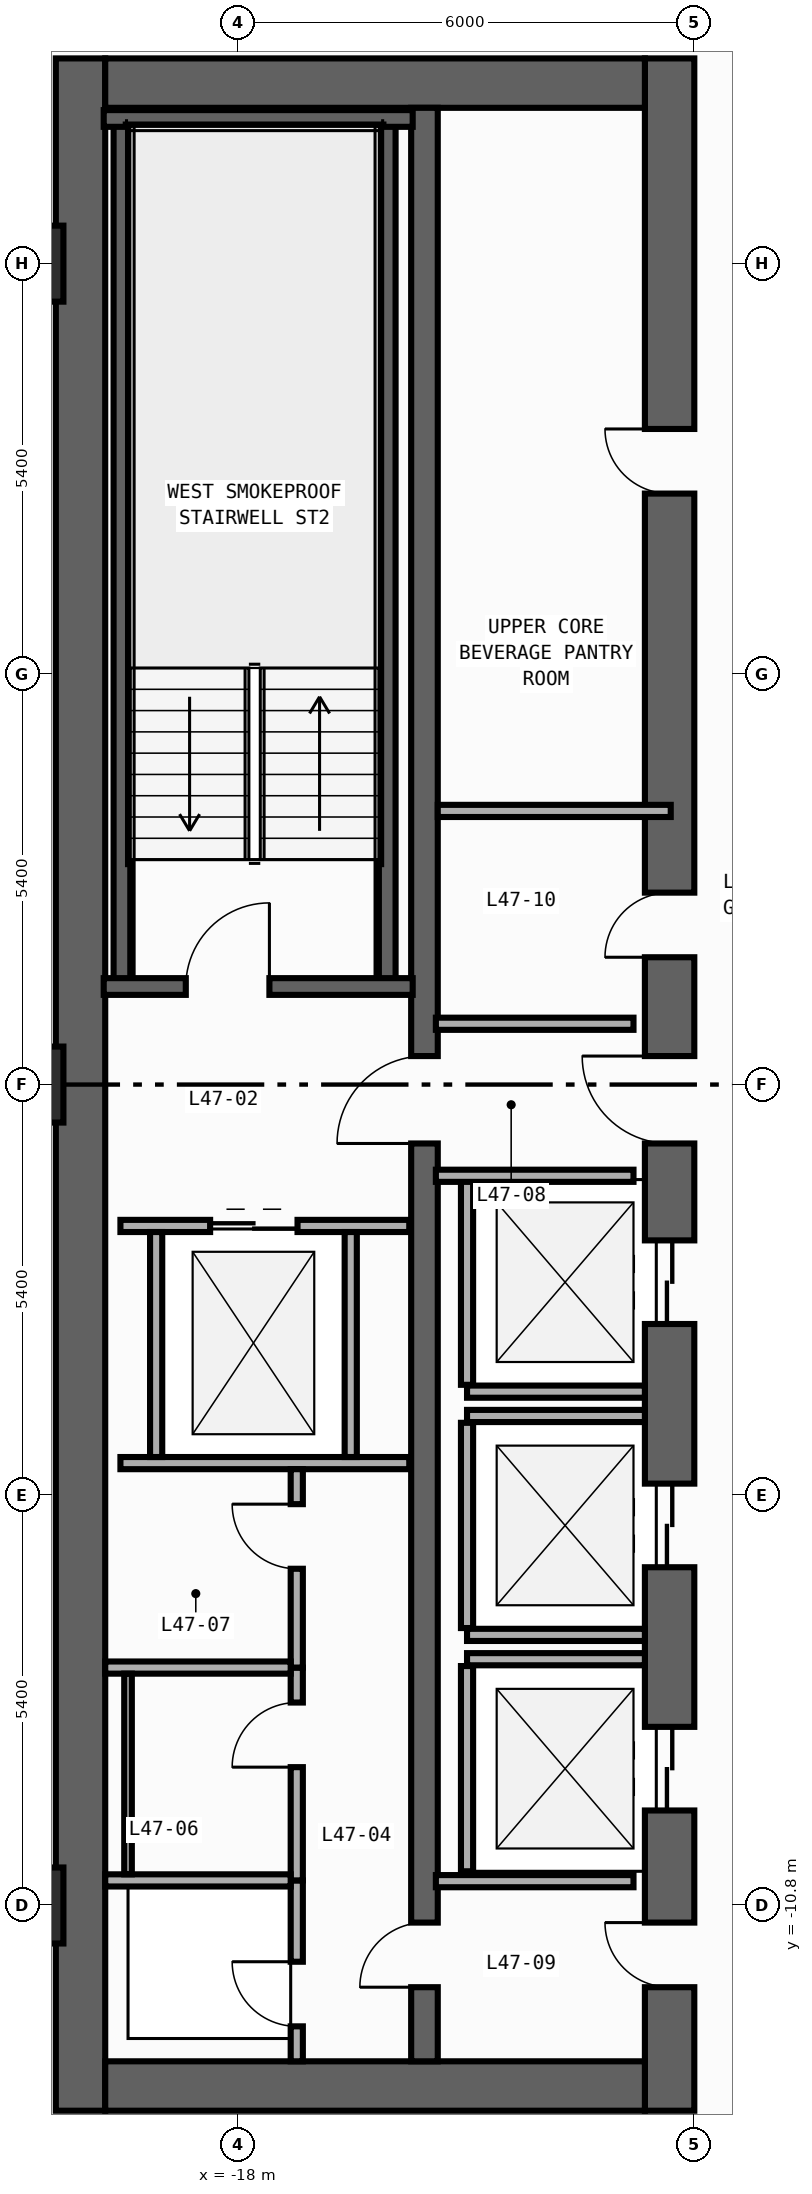
"""IFC4 building model, lengths in metres.
Left out: names, types, materials, properties, quantities, classifications, styles, units other than length and angle.
Written with IfcOpenShell. Run it as: python <this file> out.ifc"""

import sys

from ifc_helpers import new_model, si_unit, direction, frame, frame_2d, origin, origin_2d, place, context, subcontext, project, spatial, rectangle, extrude, element, fill, save


model = new_model("IFC4")
c1 = context("Model", 3, precision=1e-05, world=origin(), true_north=direction((0.0, 1.0)))
c2 = subcontext(c1, "Body", "Model", "MODEL_VIEW")
j1 = project(units=[si_unit("LENGTHUNIT", "METRE"), si_unit("PLANEANGLEUNIT", "RADIAN")], contexts=[c1])
p1 = place(None, origin())
s1 = spatial("IfcSite", under=j1, at=p1, CompositionType="ELEMENT")
p2 = place(p1, origin())
s2 = spatial("IfcBuilding", under=s1, at=p2, CompositionType="ELEMENT")
p3 = place(p2, frame((0.0, 0.0, 203.0)))
s3 = spatial("IfcBuildingStorey", under=s2, at=p3, CompositionType="ELEMENT", Elevation=203.0)
p4 = place(p3, frame((-20.075, -13.5, 0.0), z_axis=(0.0, 0.0, 1.0), x_axis=(0.0, 1.0, 0.0)))
e1 = element("IfcWall", 1, at=p4, inside=s3, PredefinedType="SHEAR", context=c2, shape_type="SweptSolid", body=[
    extrude(rectangle(XDim=27.0, YDim=0.65, at=frame_2d((13.5, 0.0))), origin(), (0.0, 0.0, 1.0), 3.54),
])
p5 = place(p3, frame((-12.325, -13.5, 0.0), z_axis=(0.0, 0.0, 1.0), x_axis=(0.0, 1.0, 0.0)))
e2 = element("IfcWall", 2, at=p5, inside=s3, PredefinedType="SHEAR", context=c2, shape_type="SweptSolid", body=[
    extrude(rectangle(XDim=27.0, YDim=0.65, at=frame_2d((13.5, 0.0))), origin(), (0.0, 0.0, 1.0), 3.54),
])
p6 = place(p5, frame((10.35, 0.0, 0.0)))
e3 = element("IfcOpeningElement", 3, at=p6, cuts=e2, PredefinedType="OPENING", context=c2, shape_type="SweptSolid", body=[
    extrude(rectangle(XDim=1.1, YDim=2.2, at=frame_2d((0.55, 1.1))), frame((0.0, 0.335, 0.0), z_axis=(0.0, -1.0, 0.0), x_axis=(1.0, 0.0, 0.0)), (0.0, 0.0, 1.0), 0.67),
])
p7 = place(p5, frame((7.15, 0.0, 0.0)))
e4 = element("IfcOpeningElement", 4, at=p7, cuts=e2, PredefinedType="OPENING", context=c2, shape_type="SweptSolid", body=[
    extrude(rectangle(XDim=1.1, YDim=2.2, at=frame_2d((0.55, 1.1))), frame((0.0, 0.335, 0.0), z_axis=(0.0, -1.0, 0.0), x_axis=(1.0, 0.0, 0.0)), (0.0, 0.0, 1.0), 0.67),
])
p8 = place(p5, frame((3.95, 0.0, 0.0)))
e5 = element("IfcOpeningElement", 5, at=p8, cuts=e2, PredefinedType="OPENING", context=c2, shape_type="SweptSolid", body=[
    extrude(rectangle(XDim=1.1, YDim=2.2, at=frame_2d((0.55, 1.1))), frame((0.0, 0.335, 0.0), z_axis=(0.0, -1.0, 0.0), x_axis=(1.0, 0.0, 0.0)), (0.0, 0.0, 1.0), 0.67),
])
p9 = place(p5, frame((15.175, 0.0, 0.0)))
e6 = element("IfcOpeningElement", 6, at=p9, cuts=e2, PredefinedType="OPENING", context=c2, shape_type="SweptSolid", body=[
    extrude(rectangle(XDim=0.85, YDim=2.1, at=frame_2d((0.425, 1.05))), frame((0.0, 0.335, 0.0), z_axis=(0.0, -1.0, 0.0), x_axis=(1.0, 0.0, 0.0)), (0.0, 0.0, 1.0), 0.67),
])
p10 = place(p5, frame((21.275, 0.0, 0.0)))
e7 = element("IfcOpeningElement", 7, at=p10, cuts=e2, PredefinedType="OPENING", context=c2, shape_type="SweptSolid", body=[
    extrude(rectangle(XDim=0.85, YDim=2.1, at=frame_2d((0.425, 1.05))), frame((0.0, 0.335, 0.0), z_axis=(0.0, -1.0, 0.0), x_axis=(1.0, 0.0, 0.0)), (0.0, 0.0, 1.0), 0.67),
])
p11 = place(p5, frame((12.725, 0.0, 0.0)))
e8 = element("IfcOpeningElement", 8, at=p11, cuts=e2, PredefinedType="OPENING", context=c2, shape_type="SweptSolid", body=[
    extrude(rectangle(XDim=1.15, YDim=2.2, at=frame_2d((0.575, 1.1))), frame((0.0, 0.335, 0.0), z_axis=(0.0, -1.0, 0.0), x_axis=(1.0, 0.0, 0.0)), (0.0, 0.0, 1.0), 0.67),
])
p12 = place(p5, frame((1.625, 0.0, 0.0)))
e9 = element("IfcOpeningElement", 9, at=p12, cuts=e2, PredefinedType="OPENING", context=c2, shape_type="SweptSolid", body=[
    extrude(rectangle(XDim=0.85, YDim=2.1, at=frame_2d((0.425, 1.05))), frame((0.0, 0.335, 0.0), z_axis=(0.0, -1.0, 0.0), x_axis=(1.0, 0.0, 0.0)), (0.0, 0.0, 1.0), 0.67),
])
for number, where, z_axis, x_axis in (
    (10, (-19.75, -13.175, 0.0), (0.0, 0.0, 1.0), (1.0, 0.0, 0.0)),
    (11, (-19.75, 13.175, 0.0), (0.0, 0.0, 1.0), (1.0, 0.0, 0.0)),
):
    element("IfcWall", number, at=place(p3, frame(where, z_axis=z_axis, x_axis=x_axis)), inside=s3, PredefinedType="SHEAR", context=c2, shape_type="SweptSolid", body=[
        extrude(rectangle(XDim=7.1, YDim=0.65, at=frame_2d((3.55, 0.0))), origin(), (0.0, 0.0, 1.0), 3.54),
    ])
p13 = place(p3, frame((-15.55, -12.85, 0.0), z_axis=(0.0, 0.0, 1.0), x_axis=(0.0, 1.0, 0.0)))
e12 = element("IfcWall", 12, at=p13, inside=s3, PredefinedType="SHEAR", context=c2, shape_type="SweptSolid", body=[
    extrude(rectangle(XDim=25.7, YDim=0.35, at=frame_2d((12.85, 0.0))), origin(), (0.0, 0.0, 1.0), 3.54),
])
p14 = place(p13, frame((12.075, 0.0, 0.0)))
e13 = element("IfcOpeningElement", 13, at=p14, cuts=e12, PredefinedType="OPENING", context=c2, shape_type="SweptSolid", body=[
    extrude(rectangle(XDim=1.15, YDim=2.2, at=frame_2d((0.575, 1.1))), frame((0.0, 0.185, 0.0), z_axis=(0.0, -1.0, 0.0), x_axis=(1.0, 0.0, 0.0)), (0.0, 0.0, 1.0), 0.37),
])
p15 = place(p13, frame((0.975, 0.0, 0.0)))
e14 = element("IfcOpeningElement", 14, at=p15, cuts=e12, PredefinedType="OPENING", context=c2, shape_type="SweptSolid", body=[
    extrude(rectangle(XDim=0.85, YDim=2.1, at=frame_2d((0.425, 1.05))), frame((0.0, 0.185, 0.0), z_axis=(0.0, -1.0, 0.0), x_axis=(1.0, 0.0, 0.0)), (0.0, 0.0, 1.0), 0.37),
])
for number, where, z_axis, x_axis in (
    (15, (-16.04, 1.29, 0.0), (0.0, 0.0, 1.0), (0.0, 1.0, 0.0)),
    (16, (-19.53, 1.29, 0.0), (0.0, 0.0, 1.0), (0.0, 1.0, 0.0)),
):
    element("IfcWall", number, at=place(p3, frame(where, z_axis=z_axis, x_axis=x_axis)), inside=s3, PredefinedType="SHEAR", context=c2, shape_type="SweptSolid", body=[
        extrude(rectangle(XDim=11.42, YDim=0.22, at=frame_2d((5.71, 0.0))), origin(), (0.0, 0.0, 1.0), 3.54),
    ])
p16 = place(p3, frame((-19.77, 12.71, 0.0), z_axis=(0.0, 0.0, 1.0), x_axis=(1.0, 0.0, 0.0)))
e17 = element("IfcWall", 17, at=p16, inside=s3, PredefinedType="SHEAR", context=c2, shape_type="SweptSolid", body=[
    extrude(rectangle(XDim=4.065, YDim=0.22, at=frame_2d((2.032, 0.0))), origin(), (0.0, 0.0, 1.0), 3.54),
])
p17 = place(p3, frame((-19.77, 1.29, 0.0), z_axis=(0.0, 0.0, 1.0), x_axis=(1.0, 0.0, 0.0)))
e18 = element("IfcWall", 18, at=p17, inside=s3, PredefinedType="SHEAR", context=c2, shape_type="SweptSolid", body=[
    extrude(rectangle(XDim=4.065, YDim=0.22, at=frame_2d((2.032, 0.0))), origin(), (0.0, 0.0, 1.0), 3.54),
])
p18 = place(p17, frame((1.08, 0.0, 0.0)))
e19 = element("IfcOpeningElement", 19, at=p18, cuts=e18, PredefinedType="OPENING", context=c2, shape_type="SweptSolid", body=[
    extrude(rectangle(XDim=1.1, YDim=2.2, at=frame_2d((0.55, 1.1))), frame((0.0, 0.12, 0.0), z_axis=(0.0, -1.0, 0.0), x_axis=(1.0, 0.0, 0.0)), (0.0, 0.0, 1.0), 0.24),
])
for number, where, z_axis, x_axis in (
    (20, (-20.8, -10.8, 0.0), (0.0, 0.0, 1.0), (1.0, 0.0, 0.0)),
    (21, (-20.8, 0.0, 0.0), (0.0, 0.0, 1.0), (1.0, 0.0, 0.0)),
    (22, (-20.8, 10.8, 0.0), (0.0, 0.0, 1.0), (1.0, 0.0, 0.0)),
):
    element("IfcColumn", number, at=place(p3, frame(where, z_axis=z_axis, x_axis=x_axis)), inside=s3, PredefinedType="COLUMN", context=c2, shape_type="SweptSolid", body=[
        extrude(rectangle(XDim=1.0, YDim=1.0, at=origin_2d()), origin(), (0.0, 0.0, 1.0), 3.8),
    ])
p19 = place(p3, frame((-14.99, -4.04, 0.0), z_axis=(0.0, 0.0, 1.0), x_axis=(1.0, 0.0, 0.0)))
e23 = element("IfcWall", 23, at=p19, inside=s3, PredefinedType="STANDARD", context=c2, shape_type="SweptSolid", body=[
    extrude(rectangle(XDim=2.34, YDim=0.16, at=frame_2d((1.17, 0.0))), origin(), (0.0, 0.0, 1.0), 3.54),
])
p20 = place(p3, frame((-14.99, -3.95, 0.0), z_axis=(0.0, 0.0, 1.0), x_axis=(0.0, 1.0, 0.0)))
e24 = element("IfcWall", 24, at=p20, inside=s3, PredefinedType="STANDARD", context=c2, shape_type="SweptSolid", body=[
    extrude(rectangle(XDim=2.7, YDim=0.16, at=frame_2d((1.35, 0.0))), origin(), (0.0, 0.0, 1.0), 3.54),
])
for number, where, z_axis, x_axis in (
    (25, (-14.99, -7.24, 0.0), (0.0, 0.0, 1.0), (1.0, 0.0, 0.0)),
    (26, (-14.99, -4.36, 0.0), (0.0, 0.0, 1.0), (1.0, 0.0, 0.0)),
):
    element("IfcWall", number, at=place(p3, frame(where, z_axis=z_axis, x_axis=x_axis)), inside=s3, PredefinedType="STANDARD", context=c2, shape_type="SweptSolid", body=[
        extrude(rectangle(XDim=2.34, YDim=0.16, at=frame_2d((1.17, 0.0))), origin(), (0.0, 0.0, 1.0), 3.54),
    ])
p21 = place(p3, frame((-14.99, -7.15, 0.0), z_axis=(0.0, 0.0, 1.0), x_axis=(0.0, 1.0, 0.0)))
e27 = element("IfcWall", 27, at=p21, inside=s3, PredefinedType="STANDARD", context=c2, shape_type="SweptSolid", body=[
    extrude(rectangle(XDim=2.7, YDim=0.16, at=frame_2d((1.35, 0.0))), origin(), (0.0, 0.0, 1.0), 3.54),
])
p22 = place(p3, frame((-14.99, -7.56, 0.0), z_axis=(0.0, 0.0, 1.0), x_axis=(1.0, 0.0, 0.0)))
e28 = element("IfcWall", 28, at=p22, inside=s3, PredefinedType="STANDARD", context=c2, shape_type="SweptSolid", body=[
    extrude(rectangle(XDim=2.34, YDim=0.16, at=frame_2d((1.17, 0.0))), origin(), (0.0, 0.0, 1.0), 3.54),
])
p23 = place(p3, frame((-14.99, -10.35, 0.0), z_axis=(0.0, 0.0, 1.0), x_axis=(0.0, 1.0, 0.0)))
e29 = element("IfcWall", 29, at=p23, inside=s3, PredefinedType="STANDARD", context=c2, shape_type="SweptSolid", body=[
    extrude(rectangle(XDim=2.7, YDim=0.16, at=frame_2d((1.35, 0.0))), origin(), (0.0, 0.0, 1.0), 3.54),
])
p24 = place(p3, frame((-19.55, -1.86, 0.0), z_axis=(0.0, 0.0, 1.0), x_axis=(1.0, 0.0, 0.0)))
e30 = element("IfcWall", 30, at=p24, inside=s3, PredefinedType="STANDARD", context=c2, shape_type="SweptSolid", body=[
    extrude(rectangle(XDim=3.8, YDim=0.16, at=frame_2d((1.9, 0.0))), origin(), (0.0, 0.0, 1.0), 3.54),
])
p25 = place(p24, frame((1.18, 0.0, 0.0)))
e31 = element("IfcOpeningElement", 31, at=p25, cuts=e30, PredefinedType="OPENING", context=c2, shape_type="SweptSolid", body=[
    extrude(rectangle(XDim=1.15, YDim=2.2, at=frame_2d((0.575, 1.1))), frame((0.0, 0.09, 0.0), z_axis=(0.0, -1.0, 0.0), x_axis=(1.0, 0.0, 0.0)), (0.0, 0.0, 1.0), 0.18),
])
p26 = place(p3, frame((-19.55, -4.98, 0.0), z_axis=(0.0, 0.0, 1.0), x_axis=(1.0, 0.0, 0.0)))
e32 = element("IfcWall", 32, at=p26, inside=s3, PredefinedType="STANDARD", context=c2, shape_type="SweptSolid", body=[
    extrude(rectangle(XDim=3.8, YDim=0.16, at=frame_2d((1.9, 0.0))), origin(), (0.0, 0.0, 1.0), 3.54),
])
for number, where, z_axis, x_axis in (
    (33, (-19.08, -4.9, 0.0), (0.0, 0.0, 1.0), (0.0, 1.0, 0.0)),
    (34, (-16.52, -4.9, 0.0), (0.0, 0.0, 1.0), (0.0, 1.0, 0.0)),
):
    element("IfcWall", number, at=place(p3, frame(where, z_axis=z_axis, x_axis=x_axis)), inside=s3, PredefinedType="STANDARD", context=c2, shape_type="SweptSolid", body=[
        extrude(rectangle(XDim=2.96, YDim=0.16, at=frame_2d((1.48, 0.0))), origin(), (0.0, 0.0, 1.0), 3.54),
    ])
for number, where, z_axis, x_axis in (
    (35, (-15.4, 0.8, 0.0), (0.0, 0.0, 1.0), (1.0, 0.0, 0.0)),
    (36, (-15.4, -1.2, 0.0), (0.0, 0.0, 1.0), (1.0, 0.0, 0.0)),
    (37, (-15.4, -10.48, 0.0), (0.0, 0.0, 1.0), (1.0, 0.0, 0.0)),
):
    element("IfcWall", number, at=place(p3, frame(where, z_axis=z_axis, x_axis=x_axis)), inside=s3, PredefinedType="STANDARD", context=c2, shape_type="SweptSolid", body=[
        extrude(rectangle(XDim=2.6, YDim=0.16, at=frame_2d((1.3, 0.0))), origin(), (0.0, 0.0, 1.0), 3.54),
    ])
p27 = place(p3, frame((-17.23, -12.85, 0.0), z_axis=(0.0, 0.0, 1.0), x_axis=(0.0, 1.0, 0.0)))
e38 = element("IfcWall", 38, at=p27, inside=s3, PredefinedType="PARTITIONING", context=c2, shape_type="SweptSolid", body=[
    extrude(rectangle(XDim=2.38, YDim=0.16, at=frame_2d((1.19, 0.0))), origin(), (0.0, 0.0, 1.0), 3.54),
])
p28 = place(p27, frame((0.46, 0.0, 0.0)))
e39 = element("IfcOpeningElement", 39, at=p28, cuts=e38, PredefinedType="OPENING", context=c2, shape_type="SweptSolid", body=[
    extrude(rectangle(XDim=0.85, YDim=2.1, at=frame_2d((0.425, 1.05))), frame((0.0, 0.09, 0.0), z_axis=(0.0, -1.0, 0.0), x_axis=(1.0, 0.0, 0.0)), (0.0, 0.0, 1.0), 0.18),
])
p29 = place(p3, frame((-17.23, -10.47, 0.0), z_axis=(0.0, 0.0, 1.0), x_axis=(0.0, 1.0, 0.0)))
e40 = element("IfcWall", 40, at=p29, inside=s3, PredefinedType="PARTITIONING", context=c2, shape_type="SweptSolid", body=[
    extrude(rectangle(XDim=2.8, YDim=0.16, at=frame_2d((1.4, 0.0))), origin(), (0.0, 0.0, 1.0), 3.54),
])
p30 = place(p29, frame((1.49, 0.0, 0.0)))
e41 = element("IfcOpeningElement", 41, at=p30, cuts=e40, PredefinedType="OPENING", context=c2, shape_type="SweptSolid", body=[
    extrude(rectangle(XDim=0.85, YDim=2.1, at=frame_2d((0.425, 1.05))), frame((0.0, 0.09, 0.0), z_axis=(0.0, -1.0, 0.0), x_axis=(1.0, 0.0, 0.0)), (0.0, 0.0, 1.0), 0.18),
])
p31 = place(p3, frame((-17.23, -7.67, 0.0), z_axis=(0.0, 0.0, 1.0), x_axis=(0.0, 1.0, 0.0)))
e42 = element("IfcWall", 42, at=p31, inside=s3, PredefinedType="PARTITIONING", context=c2, shape_type="SweptSolid", body=[
    extrude(rectangle(XDim=2.61, YDim=0.16, at=frame_2d((1.305, 0.0))), origin(), (0.0, 0.0, 1.0), 3.54),
])
p32 = place(p31, frame((1.3, 0.0, 0.0)))
e43 = element("IfcOpeningElement", 43, at=p32, cuts=e42, PredefinedType="OPENING", context=c2, shape_type="SweptSolid", body=[
    extrude(rectangle(XDim=0.85, YDim=2.1, at=frame_2d((0.425, 1.05))), frame((0.0, 0.09, 0.0), z_axis=(0.0, -1.0, 0.0), x_axis=(1.0, 0.0, 0.0)), (0.0, 0.0, 1.0), 0.18),
])
for number, where, z_axis, x_axis in (
    (44, (-19.75, -10.47, 0.0), (0.0, 0.0, 1.0), (1.0, 0.0, 0.0)),
    (45, (-19.75, -7.67, 0.0), (0.0, 0.0, 1.0), (1.0, 0.0, 0.0)),
):
    element("IfcWall", number, at=place(p3, frame(where, z_axis=z_axis, x_axis=x_axis)), inside=s3, PredefinedType="PARTITIONING", context=c2, shape_type="SweptSolid", body=[
        extrude(rectangle(XDim=2.44, YDim=0.16, at=frame_2d((1.22, 0.0))), origin(), (0.0, 0.0, 1.0), 3.54),
    ])
p33 = place(p3, frame((-15.375, 3.6, 0.0), z_axis=(0.0, 0.0, 1.0), x_axis=(1.0, 0.0, 0.0)))
e46 = element("IfcWall", 46, at=p33, inside=s3, PredefinedType="PARTITIONING", context=c2, shape_type="SweptSolid", body=[
    extrude(rectangle(XDim=3.065, YDim=0.16, at=frame_2d((1.532, 0.0))), origin(), (0.0, 0.0, 1.0), 3.54),
])
p34 = place(p3, frame((-19.45, -10.39, 0.0), z_axis=(0.0, 0.0, 1.0), x_axis=(0.0, 1.0, 0.0)))
e47 = element("IfcWall", 47, at=p34, inside=s3, PredefinedType="PARTITIONING", context=c2, shape_type="SweptSolid", body=[
    extrude(rectangle(XDim=2.64, YDim=0.1, at=frame_2d((1.32, 0.0))), origin(), (0.0, 0.0, 1.0), 3.54),
])
p35 = place(p18, origin())
e48 = element("IfcDoor", 48, at=p35, inside=s3, OperationType="SINGLE_SWING_RIGHT", PredefinedType="DOOR", context=c2, shape_type="SweptSolid", body=[
    extrude(rectangle(XDim=1.1, YDim=2.2, at=frame_2d((0.55, 1.1))), frame((0.0, 0.025, 0.0), z_axis=(0.0, -1.0, 0.0), x_axis=(1.0, 0.0, 0.0)), (0.0, 0.0, 1.0), 0.05),
])
fill(e19, e48)
p36 = place(p6, origin())
e49 = element("IfcDoor", 49, at=p36, inside=s3, OperationType="DOUBLE_DOOR_SLIDING", PredefinedType="DOOR", context=c2, shape_type="SweptSolid", body=[
    extrude(rectangle(XDim=1.1, YDim=2.2, at=frame_2d((0.55, 1.1))), frame((0.0, 0.025, 0.0), z_axis=(0.0, -1.0, 0.0), x_axis=(1.0, 0.0, 0.0)), (0.0, 0.0, 1.0), 0.05),
])
fill(e3, e49)
p37 = place(p7, origin())
e50 = element("IfcDoor", 50, at=p37, inside=s3, OperationType="DOUBLE_DOOR_SLIDING", PredefinedType="DOOR", context=c2, shape_type="SweptSolid", body=[
    extrude(rectangle(XDim=1.1, YDim=2.2, at=frame_2d((0.55, 1.1))), frame((0.0, 0.025, 0.0), z_axis=(0.0, -1.0, 0.0), x_axis=(1.0, 0.0, 0.0)), (0.0, 0.0, 1.0), 0.05),
])
fill(e4, e50)
p38 = place(p8, origin())
e51 = element("IfcDoor", 51, at=p38, inside=s3, OperationType="DOUBLE_DOOR_SLIDING", PredefinedType="DOOR", context=c2, shape_type="SweptSolid", body=[
    extrude(rectangle(XDim=1.1, YDim=2.2, at=frame_2d((0.55, 1.1))), frame((0.0, 0.025, 0.0), z_axis=(0.0, -1.0, 0.0), x_axis=(1.0, 0.0, 0.0)), (0.0, 0.0, 1.0), 0.05),
])
fill(e5, e51)
p39 = place(p9, origin())
e52 = element("IfcDoor", 52, at=p39, inside=s3, OperationType="SINGLE_SWING_LEFT", PredefinedType="DOOR", context=c2, shape_type="SweptSolid", body=[
    extrude(rectangle(XDim=0.85, YDim=2.1, at=frame_2d((0.425, 1.05))), frame((0.0, 0.025, 0.0), z_axis=(0.0, -1.0, 0.0), x_axis=(1.0, 0.0, 0.0)), (0.0, 0.0, 1.0), 0.05),
])
fill(e6, e52)
p40 = place(p10, origin())
e53 = element("IfcDoor", 53, at=p40, inside=s3, OperationType="SINGLE_SWING_RIGHT", PredefinedType="DOOR", context=c2, shape_type="SweptSolid", body=[
    extrude(rectangle(XDim=0.85, YDim=2.1, at=frame_2d((0.425, 1.05))), frame((0.0, 0.025, 0.0), z_axis=(0.0, -1.0, 0.0), x_axis=(1.0, 0.0, 0.0)), (0.0, 0.0, 1.0), 0.05),
])
fill(e7, e53)
p41 = place(p11, origin())
e54 = element("IfcDoor", 54, at=p41, inside=s3, OperationType="SINGLE_SWING_RIGHT", PredefinedType="DOOR", context=c2, shape_type="SweptSolid", body=[
    extrude(rectangle(XDim=1.15, YDim=2.2, at=frame_2d((0.575, 1.1))), frame((0.0, 0.025, 0.0), z_axis=(0.0, -1.0, 0.0), x_axis=(1.0, 0.0, 0.0)), (0.0, 0.0, 1.0), 0.05),
])
fill(e8, e54)
p42 = place(p14, origin())
e55 = element("IfcDoor", 55, at=p42, inside=s3, OperationType="SINGLE_SWING_LEFT", PredefinedType="DOOR", context=c2, shape_type="SweptSolid", body=[
    extrude(rectangle(XDim=1.15, YDim=2.2, at=frame_2d((0.575, 1.1))), frame((0.0, 0.025, 0.0), z_axis=(0.0, -1.0, 0.0), x_axis=(1.0, 0.0, 0.0)), (0.0, 0.0, 1.0), 0.05),
])
fill(e13, e55)
p43 = place(p12, origin())
e56 = element("IfcDoor", 56, at=p43, inside=s3, OperationType="SINGLE_SWING_RIGHT", PredefinedType="DOOR", context=c2, shape_type="SweptSolid", body=[
    extrude(rectangle(XDim=0.85, YDim=2.1, at=frame_2d((0.425, 1.05))), frame((0.0, 0.025, 0.0), z_axis=(0.0, -1.0, 0.0), x_axis=(1.0, 0.0, 0.0)), (0.0, 0.0, 1.0), 0.05),
])
fill(e9, e56)
p44 = place(p15, origin())
e57 = element("IfcDoor", 57, at=p44, inside=s3, OperationType="SINGLE_SWING_LEFT", PredefinedType="DOOR", context=c2, shape_type="SweptSolid", body=[
    extrude(rectangle(XDim=0.85, YDim=2.1, at=frame_2d((0.425, 1.05))), frame((0.0, 0.025, 0.0), z_axis=(0.0, -1.0, 0.0), x_axis=(1.0, 0.0, 0.0)), (0.0, 0.0, 1.0), 0.05),
])
fill(e14, e57)
p45 = place(p25, origin())
e58 = element("IfcDoor", 58, at=p45, inside=s3, OperationType="DOUBLE_DOOR_SLIDING", PredefinedType="DOOR", context=c2, shape_type="SweptSolid", body=[
    extrude(rectangle(XDim=1.15, YDim=2.2, at=frame_2d((0.575, 1.1))), frame((0.0, 0.025, 0.0), z_axis=(0.0, -1.0, 0.0), x_axis=(1.0, 0.0, 0.0)), (0.0, 0.0, 1.0), 0.05),
])
fill(e31, e58)
p46 = place(p28, origin())
e59 = element("IfcDoor", 59, at=p46, inside=s3, OperationType="SINGLE_SWING_RIGHT", PredefinedType="DOOR", context=c2, shape_type="SweptSolid", body=[
    extrude(rectangle(XDim=0.85, YDim=2.1, at=frame_2d((0.425, 1.05))), frame((0.0, 0.025, 0.0), z_axis=(0.0, -1.0, 0.0), x_axis=(1.0, 0.0, 0.0)), (0.0, 0.0, 1.0), 0.05),
])
fill(e39, e59)
p47 = place(p30, origin())
e60 = element("IfcDoor", 60, at=p47, inside=s3, OperationType="SINGLE_SWING_LEFT", PredefinedType="DOOR", context=c2, shape_type="SweptSolid", body=[
    extrude(rectangle(XDim=0.85, YDim=2.1, at=frame_2d((0.425, 1.05))), frame((0.0, 0.025, 0.0), z_axis=(0.0, -1.0, 0.0), x_axis=(1.0, 0.0, 0.0)), (0.0, 0.0, 1.0), 0.05),
])
fill(e41, e60)
p48 = place(p32, origin())
e61 = element("IfcDoor", 61, at=p48, inside=s3, OperationType="SINGLE_SWING_RIGHT", PredefinedType="DOOR", context=c2, shape_type="SweptSolid", body=[
    extrude(rectangle(XDim=0.85, YDim=2.1, at=frame_2d((0.425, 1.05))), frame((0.0, 0.025, 0.0), z_axis=(0.0, -1.0, 0.0), x_axis=(1.0, 0.0, 0.0)), (0.0, 0.0, 1.0), 0.05),
])
fill(e43, e61)
save(model, sys.argv[1])
